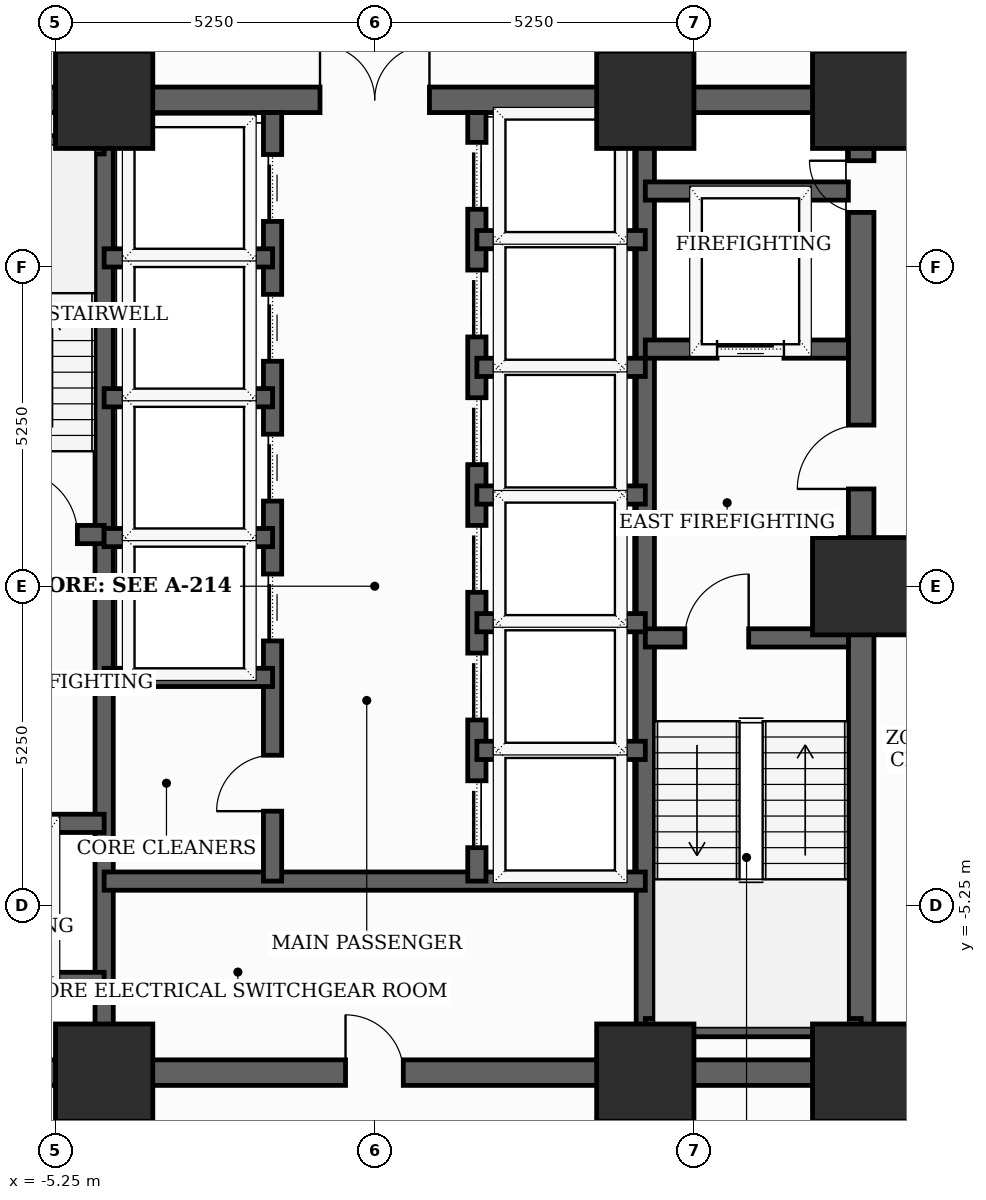
"""IFC4 building model, lengths in metres.
Left out: names, types, materials, properties, quantities, classifications, styles, units other than length and angle.
Written with IfcOpenShell. Run it as: python <this file> out.ifc"""

import sys

from ifc_helpers import new_model, si_unit, direction, frame, frame_2d, origin, origin_2d, place, context, subcontext, project, spatial, rectangle, extrude, element, fill, save


model = new_model("IFC4")
c1 = context("Model", 3, precision=1e-05, world=origin(), true_north=direction((0.0, 1.0)))
c2 = subcontext(c1, "Body", "Model", "MODEL_VIEW")
j1 = project(units=[si_unit("LENGTHUNIT", "METRE"), si_unit("PLANEANGLEUNIT", "RADIAN")], contexts=[c1])
p1 = place(None, origin())
s1 = spatial("IfcSite", under=j1, at=p1, CompositionType="ELEMENT")
p2 = place(p1, origin())
s2 = spatial("IfcBuilding", under=s1, at=p2, CompositionType="ELEMENT")
p3 = place(p2, frame((0.0, 0.0, 55.6)))
s3 = spatial("IfcBuildingStorey", under=s2, at=p3, CompositionType="ELEMENT", Elevation=55.6)
for number, where, z_axis, x_axis in (
    (1, (-4.45, -8.0, 0.0), (0.0, 0.0, 1.0), (1.0, 0.0, 0.0)),
    (2, (4.45, -8.0, 0.0), (0.0, 0.0, 1.0), (1.0, 0.0, 0.0)),
    (3, (8.0, -8.0, 0.0), (0.0, 0.0, 1.0), (1.0, 0.0, 0.0)),
    (4, (8.0, 0.0, 0.0), (0.0, 0.0, 1.0), (1.0, 0.0, 0.0)),
    (5, (8.0, 8.0, 0.0), (0.0, 0.0, 1.0), (1.0, 0.0, 0.0)),
    (6, (4.45, 8.0, 0.0), (0.0, 0.0, 1.0), (1.0, 0.0, 0.0)),
    (7, (-4.45, 8.0, 0.0), (0.0, 0.0, 1.0), (1.0, 0.0, 0.0)),
):
    element("IfcColumn", number, at=place(p3, frame(where, z_axis=z_axis, x_axis=x_axis)), inside=s3, PredefinedType="COLUMN", context=c2, shape_type="SweptSolid", body=[
        extrude(rectangle(XDim=1.6, YDim=1.6, at=origin_2d()), origin(), (0.0, 0.0, 1.0), 3.7),
    ])
p4 = place(p3, frame((8.0, -8.0, 0.0), z_axis=(0.0, 0.0, 1.0), x_axis=(0.0, 1.0, 0.0)))
e8 = element("IfcWall", 8, at=p4, inside=s3, PredefinedType="SHEAR", context=c2, shape_type="SweptSolid", body=[
    extrude(rectangle(XDim=16.0, YDim=0.42, at=frame_2d((8.0, 0.0))), origin(), (0.0, 0.0, 1.0), 3.5),
])
p5 = place(p4, frame((9.6, 0.0, 0.0)))
e9 = element("IfcOpeningElement", 9, at=p5, cuts=e8, PredefinedType="OPENING", context=c2, shape_type="SweptSolid", body=[
    extrude(rectangle(XDim=1.05, YDim=2.15, at=frame_2d((0.525, 1.075))), frame((0.0, 0.22, 0.0), z_axis=(0.0, -1.0, 0.0), x_axis=(1.0, 0.0, 0.0)), (0.0, 0.0, 1.0), 0.44),
])
p6 = place(p4, frame((14.148, 0.0, 0.0)))
e10 = element("IfcOpeningElement", 10, at=p6, cuts=e8, PredefinedType="OPENING", context=c2, shape_type="SweptSolid", body=[
    extrude(rectangle(XDim=0.85, YDim=2.02, at=frame_2d((0.425, 1.01))), frame((0.0, 0.22, 0.0), z_axis=(0.0, -1.0, 0.0), x_axis=(1.0, 0.0, 0.0)), (0.0, 0.0, 1.0), 0.44),
])
p7 = place(p3, frame((-8.0, -8.0, 0.0), z_axis=(0.0, 0.0, 1.0), x_axis=(1.0, 0.0, 0.0)))
e11 = element("IfcWall", 11, at=p7, inside=s3, PredefinedType="SHEAR", context=c2, shape_type="SweptSolid", body=[
    extrude(rectangle(XDim=16.0, YDim=0.42, at=frame_2d((8.0, 0.0))), origin(), (0.0, 0.0, 1.0), 3.5),
])
p8 = place(p7, frame((7.52, 0.0, 0.0)))
e12 = element("IfcOpeningElement", 12, at=p8, cuts=e11, PredefinedType="OPENING", context=c2, shape_type="SweptSolid", body=[
    extrude(rectangle(XDim=0.95, YDim=2.1, at=frame_2d((0.475, 1.05))), frame((0.0, 0.22, 0.0), z_axis=(0.0, -1.0, 0.0), x_axis=(1.0, 0.0, 0.0)), (0.0, 0.0, 1.0), 0.44),
])
p9 = place(p3, frame((-8.0, 8.0, 0.0), z_axis=(0.0, 0.0, 1.0), x_axis=(1.0, 0.0, 0.0)))
e13 = element("IfcWall", 13, at=p9, inside=s3, PredefinedType="SHEAR", context=c2, shape_type="SweptSolid", body=[
    extrude(rectangle(XDim=16.0, YDim=0.42, at=frame_2d((8.0, 0.0))), origin(), (0.0, 0.0, 1.0), 3.5),
])
p10 = place(p9, frame((7.1, 0.0, 0.0)))
e14 = element("IfcOpeningElement", 14, at=p10, cuts=e13, PredefinedType="OPENING", context=c2, shape_type="SweptSolid", body=[
    extrude(rectangle(XDim=1.8, YDim=2.15, at=frame_2d((0.9, 1.075))), frame((0.0, 0.22, 0.0), z_axis=(0.0, -1.0, 0.0), x_axis=(1.0, 0.0, 0.0)), (0.0, 0.0, 1.0), 0.44),
])
for number, where, z_axis, x_axis in (
    (15, (-4.45, -7.79, 0.0), (0.0, 0.0, 1.0), (0.0, 1.0, 0.0)),
    (16, (4.45, -7.79, 0.0), (0.0, 0.0, 1.0), (0.0, 1.0, 0.0)),
):
    element("IfcWall", number, at=place(p3, frame(where, z_axis=z_axis, x_axis=x_axis)), inside=s3, PredefinedType="SHEAR", context=c2, shape_type="SweptSolid", body=[
        extrude(rectangle(XDim=15.58, YDim=0.3, at=frame_2d((7.79, 0.0))), origin(), (0.0, 0.0, 1.0), 3.5),
    ])
p11 = place(p3, frame((-7.79, 0.85, 0.0), z_axis=(0.0, 0.0, 1.0), x_axis=(1.0, 0.0, 0.0)))
e17 = element("IfcWall", 17, at=p11, inside=s3, PredefinedType="SHEAR", context=c2, shape_type="SweptSolid", body=[
    extrude(rectangle(XDim=3.34, YDim=0.3, at=frame_2d((1.67, 0.0))), origin(), (0.0, 0.0, 1.0), 3.5),
])
p12 = place(p11, frame((1.85, 0.0, 0.0)))
e18 = element("IfcOpeningElement", 18, at=p12, cuts=e17, PredefinedType="OPENING", context=c2, shape_type="SweptSolid", body=[
    extrude(rectangle(XDim=1.05, YDim=2.15, at=frame_2d((0.525, 1.075))), frame((0.0, 0.16, 0.0), z_axis=(0.0, -1.0, 0.0), x_axis=(1.0, 0.0, 0.0)), (0.0, 0.0, 1.0), 0.32),
])
p13 = place(p3, frame((-7.79, 7.26, 0.0), z_axis=(0.0, 0.0, 1.0), x_axis=(1.0, 0.0, 0.0)))
e19 = element("IfcWall", 19, at=p13, inside=s3, PredefinedType="SHEAR", context=c2, shape_type="SweptSolid", body=[
    extrude(rectangle(XDim=3.34, YDim=0.3, at=frame_2d((1.67, 0.0))), origin(), (0.0, 0.0, 1.0), 3.5),
])
p14 = place(p3, frame((4.45, -0.85, 0.0), z_axis=(0.0, 0.0, 1.0), x_axis=(1.0, 0.0, 0.0)))
e20 = element("IfcWall", 20, at=p14, inside=s3, PredefinedType="SHEAR", context=c2, shape_type="SweptSolid", body=[
    extrude(rectangle(XDim=3.34, YDim=0.3, at=frame_2d((1.67, 0.0))), origin(), (0.0, 0.0, 1.0), 3.5),
])
p15 = place(p14, frame((0.65, 0.0, 0.0)))
e21 = element("IfcOpeningElement", 21, at=p15, cuts=e20, PredefinedType="OPENING", context=c2, shape_type="SweptSolid", body=[
    extrude(rectangle(XDim=1.05, YDim=2.15, at=frame_2d((0.525, 1.075))), frame((0.0, 0.16, 0.0), z_axis=(0.0, -1.0, 0.0), x_axis=(1.0, 0.0, 0.0)), (0.0, 0.0, 1.0), 0.32),
])
p16 = place(p3, frame((4.45, -7.26, 0.0), z_axis=(0.0, 0.0, 1.0), x_axis=(1.0, 0.0, 0.0)))
e22 = element("IfcWall", 22, at=p16, inside=s3, PredefinedType="SHEAR", context=c2, shape_type="SweptSolid", body=[
    extrude(rectangle(XDim=3.55, YDim=0.3, at=frame_2d((1.775, 0.0))), origin(), (0.0, 0.0, 1.0), 3.5),
])
p17 = place(p3, frame((-7.79, -3.9, 0.0), z_axis=(0.0, 0.0, 1.0), x_axis=(1.0, 0.0, 0.0)))
e23 = element("IfcWall", 23, at=p17, inside=s3, PredefinedType="SHEAR", context=c2, shape_type="SweptSolid", body=[
    extrude(rectangle(XDim=3.34, YDim=0.3, at=frame_2d((1.67, 0.0))), origin(), (0.0, 0.0, 1.0), 3.5),
])
p18 = place(p17, frame((1.27, 0.0, 0.0)))
e24 = element("IfcOpeningElement", 24, at=p18, cuts=e23, PredefinedType="OPENING", context=c2, shape_type="SweptSolid", body=[
    extrude(rectangle(XDim=1.1, YDim=2.1, at=frame_2d((0.55, 1.05))), frame((0.0, 0.16, 0.0), z_axis=(0.0, -1.0, 0.0), x_axis=(1.0, 0.0, 0.0)), (0.0, 0.0, 1.0), 0.32),
])
p19 = place(p3, frame((-7.79, -6.5, 0.0), z_axis=(0.0, 0.0, 1.0), x_axis=(1.0, 0.0, 0.0)))
e25 = element("IfcWall", 25, at=p19, inside=s3, PredefinedType="SHEAR", context=c2, shape_type="SweptSolid", body=[
    extrude(rectangle(XDim=3.34, YDim=0.3, at=frame_2d((1.67, 0.0))), origin(), (0.0, 0.0, 1.0), 3.5),
])
p20 = place(p3, frame((4.45, 3.9, 0.0), z_axis=(0.0, 0.0, 1.0), x_axis=(1.0, 0.0, 0.0)))
e26 = element("IfcWall", 26, at=p20, inside=s3, PredefinedType="SHEAR", context=c2, shape_type="SweptSolid", body=[
    extrude(rectangle(XDim=3.34, YDim=0.3, at=frame_2d((1.67, 0.0))), origin(), (0.0, 0.0, 1.0), 3.5),
])
p21 = place(p20, frame((1.18, 0.0, 0.0)))
e27 = element("IfcOpeningElement", 27, at=p21, cuts=e26, PredefinedType="OPENING", context=c2, shape_type="SweptSolid", body=[
    extrude(rectangle(XDim=1.1, YDim=2.1, at=frame_2d((0.55, 1.05))), frame((0.0, 0.16, 0.0), z_axis=(0.0, -1.0, 0.0), x_axis=(1.0, 0.0, 0.0)), (0.0, 0.0, 1.0), 0.32),
])
p22 = place(p3, frame((4.45, 6.5, 0.0), z_axis=(0.0, 0.0, 1.0), x_axis=(1.0, 0.0, 0.0)))
e28 = element("IfcWall", 28, at=p22, inside=s3, PredefinedType="SHEAR", context=c2, shape_type="SweptSolid", body=[
    extrude(rectangle(XDim=3.34, YDim=0.3, at=frame_2d((1.67, 0.0))), origin(), (0.0, 0.0, 1.0), 3.5),
])
p23 = place(p3, frame((-4.45, -4.85, 0.0), z_axis=(0.0, 0.0, 1.0), x_axis=(1.0, 0.0, 0.0)))
e29 = element("IfcWall", 29, at=p23, inside=s3, PredefinedType="SHEAR", context=c2, shape_type="SweptSolid", body=[
    extrude(rectangle(XDim=8.9, YDim=0.3, at=frame_2d((4.45, 0.0))), origin(), (0.0, 0.0, 1.0), 3.5),
])
p24 = place(p3, frame((-1.68, -4.85, 0.0), z_axis=(0.0, 0.0, 1.0), x_axis=(0.0, 1.0, 0.0)))
e30 = element("IfcWall", 30, at=p24, inside=s3, PredefinedType="SHEAR", context=c2, shape_type="SweptSolid", body=[
    extrude(rectangle(XDim=12.64, YDim=0.3, at=frame_2d((6.32, 0.0))), origin(), (0.0, 0.0, 1.0), 3.5),
])
p25 = place(p24, frame((3.95, 0.0, 0.0)))
e31 = element("IfcOpeningElement", 31, at=p25, cuts=e30, PredefinedType="OPENING", context=c2, shape_type="SweptSolid", body=[
    extrude(rectangle(XDim=1.1, YDim=2.1, at=frame_2d((0.55, 1.05))), frame((0.0, 0.16, 0.0), z_axis=(0.0, -1.0, 0.0), x_axis=(1.0, 0.0, 0.0)), (0.0, 0.0, 1.0), 0.32),
])
p26 = place(p24, frame((6.25, 0.0, 0.0)))
e32 = element("IfcOpeningElement", 32, at=p26, cuts=e30, PredefinedType="OPENING", context=c2, shape_type="SweptSolid", body=[
    extrude(rectangle(XDim=1.1, YDim=2.1, at=frame_2d((0.55, 1.05))), frame((0.0, 0.16, 0.0), z_axis=(0.0, -1.0, 0.0), x_axis=(1.0, 0.0, 0.0)), (0.0, 0.0, 1.0), 0.32),
])
p27 = place(p24, frame((8.55, 0.0, 0.0)))
e33 = element("IfcOpeningElement", 33, at=p27, cuts=e30, PredefinedType="OPENING", context=c2, shape_type="SweptSolid", body=[
    extrude(rectangle(XDim=1.1, YDim=2.1, at=frame_2d((0.55, 1.05))), frame((0.0, 0.16, 0.0), z_axis=(0.0, -1.0, 0.0), x_axis=(1.0, 0.0, 0.0)), (0.0, 0.0, 1.0), 0.32),
])
p28 = place(p24, frame((10.85, 0.0, 0.0)))
e34 = element("IfcOpeningElement", 34, at=p28, cuts=e30, PredefinedType="OPENING", context=c2, shape_type="SweptSolid", body=[
    extrude(rectangle(XDim=1.1, YDim=2.1, at=frame_2d((0.55, 1.05))), frame((0.0, 0.16, 0.0), z_axis=(0.0, -1.0, 0.0), x_axis=(1.0, 0.0, 0.0)), (0.0, 0.0, 1.0), 0.32),
])
p29 = place(p24, frame((1.15, 0.0, 0.0)))
e35 = element("IfcOpeningElement", 35, at=p29, cuts=e30, PredefinedType="OPENING", context=c2, shape_type="SweptSolid", body=[
    extrude(rectangle(XDim=0.92, YDim=2.1, at=frame_2d((0.46, 1.05))), frame((0.0, 0.16, 0.0), z_axis=(0.0, -1.0, 0.0), x_axis=(1.0, 0.0, 0.0)), (0.0, 0.0, 1.0), 0.32),
])
p30 = place(p3, frame((1.68, -4.85, 0.0), z_axis=(0.0, 0.0, 1.0), x_axis=(0.0, 1.0, 0.0)))
e36 = element("IfcWall", 36, at=p30, inside=s3, PredefinedType="SHEAR", context=c2, shape_type="SweptSolid", body=[
    extrude(rectangle(XDim=12.64, YDim=0.3, at=frame_2d((6.32, 0.0))), origin(), (0.0, 0.0, 1.0), 3.5),
])
p31 = place(p30, frame((0.55, 0.0, 0.0)))
e37 = element("IfcOpeningElement", 37, at=p31, cuts=e36, PredefinedType="OPENING", context=c2, shape_type="SweptSolid", body=[
    extrude(rectangle(XDim=1.1, YDim=2.1, at=frame_2d((0.55, 1.05))), frame((0.0, 0.16, 0.0), z_axis=(0.0, -1.0, 0.0), x_axis=(1.0, 0.0, 0.0)), (0.0, 0.0, 1.0), 0.32),
])
p32 = place(p30, frame((2.65, 0.0, 0.0)))
e38 = element("IfcOpeningElement", 38, at=p32, cuts=e36, PredefinedType="OPENING", context=c2, shape_type="SweptSolid", body=[
    extrude(rectangle(XDim=1.1, YDim=2.1, at=frame_2d((0.55, 1.05))), frame((0.0, 0.16, 0.0), z_axis=(0.0, -1.0, 0.0), x_axis=(1.0, 0.0, 0.0)), (0.0, 0.0, 1.0), 0.32),
])
p33 = place(p30, frame((4.75, 0.0, 0.0)))
e39 = element("IfcOpeningElement", 39, at=p33, cuts=e36, PredefinedType="OPENING", context=c2, shape_type="SweptSolid", body=[
    extrude(rectangle(XDim=1.1, YDim=2.1, at=frame_2d((0.55, 1.05))), frame((0.0, 0.16, 0.0), z_axis=(0.0, -1.0, 0.0), x_axis=(1.0, 0.0, 0.0)), (0.0, 0.0, 1.0), 0.32),
])
p34 = place(p30, frame((6.85, 0.0, 0.0)))
e40 = element("IfcOpeningElement", 40, at=p34, cuts=e36, PredefinedType="OPENING", context=c2, shape_type="SweptSolid", body=[
    extrude(rectangle(XDim=1.1, YDim=2.1, at=frame_2d((0.55, 1.05))), frame((0.0, 0.16, 0.0), z_axis=(0.0, -1.0, 0.0), x_axis=(1.0, 0.0, 0.0)), (0.0, 0.0, 1.0), 0.32),
])
p35 = place(p30, frame((8.95, 0.0, 0.0)))
e41 = element("IfcOpeningElement", 41, at=p35, cuts=e36, PredefinedType="OPENING", context=c2, shape_type="SweptSolid", body=[
    extrude(rectangle(XDim=1.1, YDim=2.1, at=frame_2d((0.55, 1.05))), frame((0.0, 0.16, 0.0), z_axis=(0.0, -1.0, 0.0), x_axis=(1.0, 0.0, 0.0)), (0.0, 0.0, 1.0), 0.32),
])
p36 = place(p30, frame((11.05, 0.0, 0.0)))
e42 = element("IfcOpeningElement", 42, at=p36, cuts=e36, PredefinedType="OPENING", context=c2, shape_type="SweptSolid", body=[
    extrude(rectangle(XDim=1.1, YDim=2.1, at=frame_2d((0.55, 1.05))), frame((0.0, 0.16, 0.0), z_axis=(0.0, -1.0, 0.0), x_axis=(1.0, 0.0, 0.0)), (0.0, 0.0, 1.0), 0.32),
])
for number, where, z_axis, x_axis in (
    (43, (-4.45, -1.5, 0.0), (0.0, 0.0, 1.0), (1.0, 0.0, 0.0)),
    (44, (-4.45, 0.8, 0.0), (0.0, 0.0, 1.0), (1.0, 0.0, 0.0)),
    (45, (-4.45, 3.1, 0.0), (0.0, 0.0, 1.0), (1.0, 0.0, 0.0)),
    (46, (-4.45, 5.4, 0.0), (0.0, 0.0, 1.0), (1.0, 0.0, 0.0)),
    (47, (1.68, 1.5, 0.0), (0.0, 0.0, 1.0), (1.0, 0.0, 0.0)),
    (48, (1.68, 3.6, 0.0), (0.0, 0.0, 1.0), (1.0, 0.0, 0.0)),
    (49, (1.68, 5.7, 0.0), (0.0, 0.0, 1.0), (1.0, 0.0, 0.0)),
    (50, (1.68, -2.7, 0.0), (0.0, 0.0, 1.0), (1.0, 0.0, 0.0)),
    (51, (1.68, -0.6, 0.0), (0.0, 0.0, 1.0), (1.0, 0.0, 0.0)),
):
    element("IfcWall", number, at=place(p3, frame(where, z_axis=z_axis, x_axis=x_axis)), inside=s3, PredefinedType="SHEAR", context=c2, shape_type="SweptSolid", body=[
        extrude(rectangle(XDim=2.77, YDim=0.3, at=frame_2d((1.385, 0.0))), origin(), (0.0, 0.0, 1.0), 3.5),
    ])
p37 = place(p5, origin())
e52 = element("IfcDoor", 52, at=p37, inside=s3, OperationType="SINGLE_SWING_LEFT", PredefinedType="DOOR", context=c2, shape_type="SweptSolid", body=[
    extrude(rectangle(XDim=1.05, YDim=2.15, at=frame_2d((0.525, 1.075))), frame((0.0, 0.025, 0.0), z_axis=(0.0, -1.0, 0.0), x_axis=(1.0, 0.0, 0.0)), (0.0, 0.0, 1.0), 0.05),
])
fill(e9, e52)
p38 = place(p6, origin())
e53 = element("IfcDoor", 53, at=p38, inside=s3, OperationType="SINGLE_SWING_RIGHT", PredefinedType="TRAPDOOR", context=c2, shape_type="SweptSolid", body=[
    extrude(rectangle(XDim=0.85, YDim=2.02, at=frame_2d((0.425, 1.01))), frame((0.0, 0.025, 0.0), z_axis=(0.0, -1.0, 0.0), x_axis=(1.0, 0.0, 0.0)), (0.0, 0.0, 1.0), 0.05),
])
fill(e10, e53)
p39 = place(p8, origin())
e54 = element("IfcDoor", 54, at=p39, inside=s3, OperationType="SINGLE_SWING_LEFT", PredefinedType="DOOR", context=c2, shape_type="SweptSolid", body=[
    extrude(rectangle(XDim=0.95, YDim=2.1, at=frame_2d((0.475, 1.05))), frame((0.0, 0.025, 0.0), z_axis=(0.0, -1.0, 0.0), x_axis=(1.0, 0.0, 0.0)), (0.0, 0.0, 1.0), 0.05),
])
fill(e12, e54)
p40 = place(p10, origin())
e55 = element("IfcDoor", 55, at=p40, inside=s3, OperationType="DOUBLE_DOOR_SINGLE_SWING", PredefinedType="DOOR", context=c2, shape_type="SweptSolid", body=[
    extrude(rectangle(XDim=1.8, YDim=2.15, at=frame_2d((0.9, 1.075))), frame((0.0, 0.025, 0.0), z_axis=(0.0, -1.0, 0.0), x_axis=(1.0, 0.0, 0.0)), (0.0, 0.0, 1.0), 0.05),
])
fill(e14, e55)
p41 = place(p12, origin())
e56 = element("IfcDoor", 56, at=p41, inside=s3, OperationType="SINGLE_SWING_LEFT", PredefinedType="DOOR", context=c2, shape_type="SweptSolid", body=[
    extrude(rectangle(XDim=1.05, YDim=2.15, at=frame_2d((0.525, 1.075))), frame((0.0, 0.025, 0.0), z_axis=(0.0, -1.0, 0.0), x_axis=(1.0, 0.0, 0.0)), (0.0, 0.0, 1.0), 0.05),
])
fill(e18, e56)
p42 = place(p15, origin())
e57 = element("IfcDoor", 57, at=p42, inside=s3, OperationType="SINGLE_SWING_RIGHT", PredefinedType="DOOR", context=c2, shape_type="SweptSolid", body=[
    extrude(rectangle(XDim=1.05, YDim=2.15, at=frame_2d((0.525, 1.075))), frame((0.0, 0.025, 0.0), z_axis=(0.0, -1.0, 0.0), x_axis=(1.0, 0.0, 0.0)), (0.0, 0.0, 1.0), 0.05),
])
fill(e21, e57)
p43 = place(p21, origin())
e58 = element("IfcDoor", 58, at=p43, inside=s3, OperationType="SLIDING_TO_LEFT", PredefinedType="DOOR", context=c2, shape_type="SweptSolid", body=[
    extrude(rectangle(XDim=1.1, YDim=2.1, at=frame_2d((0.55, 1.05))), frame((0.0, 0.025, 0.0), z_axis=(0.0, -1.0, 0.0), x_axis=(1.0, 0.0, 0.0)), (0.0, 0.0, 1.0), 0.05),
])
fill(e27, e58)
p44 = place(p25, origin())
e59 = element("IfcDoor", 59, at=p44, inside=s3, OperationType="SLIDING_TO_LEFT", PredefinedType="DOOR", context=c2, shape_type="SweptSolid", body=[
    extrude(rectangle(XDim=1.1, YDim=2.1, at=frame_2d((0.55, 1.05))), frame((0.0, 0.025, 0.0), z_axis=(0.0, -1.0, 0.0), x_axis=(1.0, 0.0, 0.0)), (0.0, 0.0, 1.0), 0.05),
])
fill(e31, e59)
p45 = place(p26, origin())
e60 = element("IfcDoor", 60, at=p45, inside=s3, OperationType="SLIDING_TO_LEFT", PredefinedType="DOOR", context=c2, shape_type="SweptSolid", body=[
    extrude(rectangle(XDim=1.1, YDim=2.1, at=frame_2d((0.55, 1.05))), frame((0.0, 0.025, 0.0), z_axis=(0.0, -1.0, 0.0), x_axis=(1.0, 0.0, 0.0)), (0.0, 0.0, 1.0), 0.05),
])
fill(e32, e60)
p46 = place(p27, origin())
e61 = element("IfcDoor", 61, at=p46, inside=s3, OperationType="SLIDING_TO_LEFT", PredefinedType="DOOR", context=c2, shape_type="SweptSolid", body=[
    extrude(rectangle(XDim=1.1, YDim=2.1, at=frame_2d((0.55, 1.05))), frame((0.0, 0.025, 0.0), z_axis=(0.0, -1.0, 0.0), x_axis=(1.0, 0.0, 0.0)), (0.0, 0.0, 1.0), 0.05),
])
fill(e33, e61)
p47 = place(p28, origin())
e62 = element("IfcDoor", 62, at=p47, inside=s3, OperationType="SLIDING_TO_LEFT", PredefinedType="DOOR", context=c2, shape_type="SweptSolid", body=[
    extrude(rectangle(XDim=1.1, YDim=2.1, at=frame_2d((0.55, 1.05))), frame((0.0, 0.025, 0.0), z_axis=(0.0, -1.0, 0.0), x_axis=(1.0, 0.0, 0.0)), (0.0, 0.0, 1.0), 0.05),
])
fill(e34, e62)
p48 = place(p29, origin())
e63 = element("IfcDoor", 63, at=p48, inside=s3, OperationType="SINGLE_SWING_LEFT", PredefinedType="DOOR", context=c2, shape_type="SweptSolid", body=[
    extrude(rectangle(XDim=0.92, YDim=2.1, at=frame_2d((0.46, 1.05))), frame((0.0, 0.025, 0.0), z_axis=(0.0, -1.0, 0.0), x_axis=(1.0, 0.0, 0.0)), (0.0, 0.0, 1.0), 0.05),
])
fill(e35, e63)
p49 = place(p31, origin())
e64 = element("IfcDoor", 64, at=p49, inside=s3, OperationType="SLIDING_TO_LEFT", PredefinedType="DOOR", context=c2, shape_type="SweptSolid", body=[
    extrude(rectangle(XDim=1.1, YDim=2.1, at=frame_2d((0.55, 1.05))), frame((0.0, 0.025, 0.0), z_axis=(0.0, -1.0, 0.0), x_axis=(1.0, 0.0, 0.0)), (0.0, 0.0, 1.0), 0.05),
])
fill(e37, e64)
p50 = place(p32, origin())
e65 = element("IfcDoor", 65, at=p50, inside=s3, OperationType="SLIDING_TO_LEFT", PredefinedType="DOOR", context=c2, shape_type="SweptSolid", body=[
    extrude(rectangle(XDim=1.1, YDim=2.1, at=frame_2d((0.55, 1.05))), frame((0.0, 0.025, 0.0), z_axis=(0.0, -1.0, 0.0), x_axis=(1.0, 0.0, 0.0)), (0.0, 0.0, 1.0), 0.05),
])
fill(e38, e65)
p51 = place(p33, origin())
e66 = element("IfcDoor", 66, at=p51, inside=s3, OperationType="SLIDING_TO_LEFT", PredefinedType="DOOR", context=c2, shape_type="SweptSolid", body=[
    extrude(rectangle(XDim=1.1, YDim=2.1, at=frame_2d((0.55, 1.05))), frame((0.0, 0.025, 0.0), z_axis=(0.0, -1.0, 0.0), x_axis=(1.0, 0.0, 0.0)), (0.0, 0.0, 1.0), 0.05),
])
fill(e39, e66)
p52 = place(p34, origin())
e67 = element("IfcDoor", 67, at=p52, inside=s3, OperationType="SLIDING_TO_LEFT", PredefinedType="DOOR", context=c2, shape_type="SweptSolid", body=[
    extrude(rectangle(XDim=1.1, YDim=2.1, at=frame_2d((0.55, 1.05))), frame((0.0, 0.025, 0.0), z_axis=(0.0, -1.0, 0.0), x_axis=(1.0, 0.0, 0.0)), (0.0, 0.0, 1.0), 0.05),
])
fill(e40, e67)
p53 = place(p35, origin())
e68 = element("IfcDoor", 68, at=p53, inside=s3, OperationType="SLIDING_TO_LEFT", PredefinedType="DOOR", context=c2, shape_type="SweptSolid", body=[
    extrude(rectangle(XDim=1.1, YDim=2.1, at=frame_2d((0.55, 1.05))), frame((0.0, 0.025, 0.0), z_axis=(0.0, -1.0, 0.0), x_axis=(1.0, 0.0, 0.0)), (0.0, 0.0, 1.0), 0.05),
])
fill(e41, e68)
p54 = place(p36, origin())
e69 = element("IfcDoor", 69, at=p54, inside=s3, OperationType="SLIDING_TO_LEFT", PredefinedType="DOOR", context=c2, shape_type="SweptSolid", body=[
    extrude(rectangle(XDim=1.1, YDim=2.1, at=frame_2d((0.55, 1.05))), frame((0.0, 0.025, 0.0), z_axis=(0.0, -1.0, 0.0), x_axis=(1.0, 0.0, 0.0)), (0.0, 0.0, 1.0), 0.05),
])
fill(e42, e69)
save(model, sys.argv[1])
